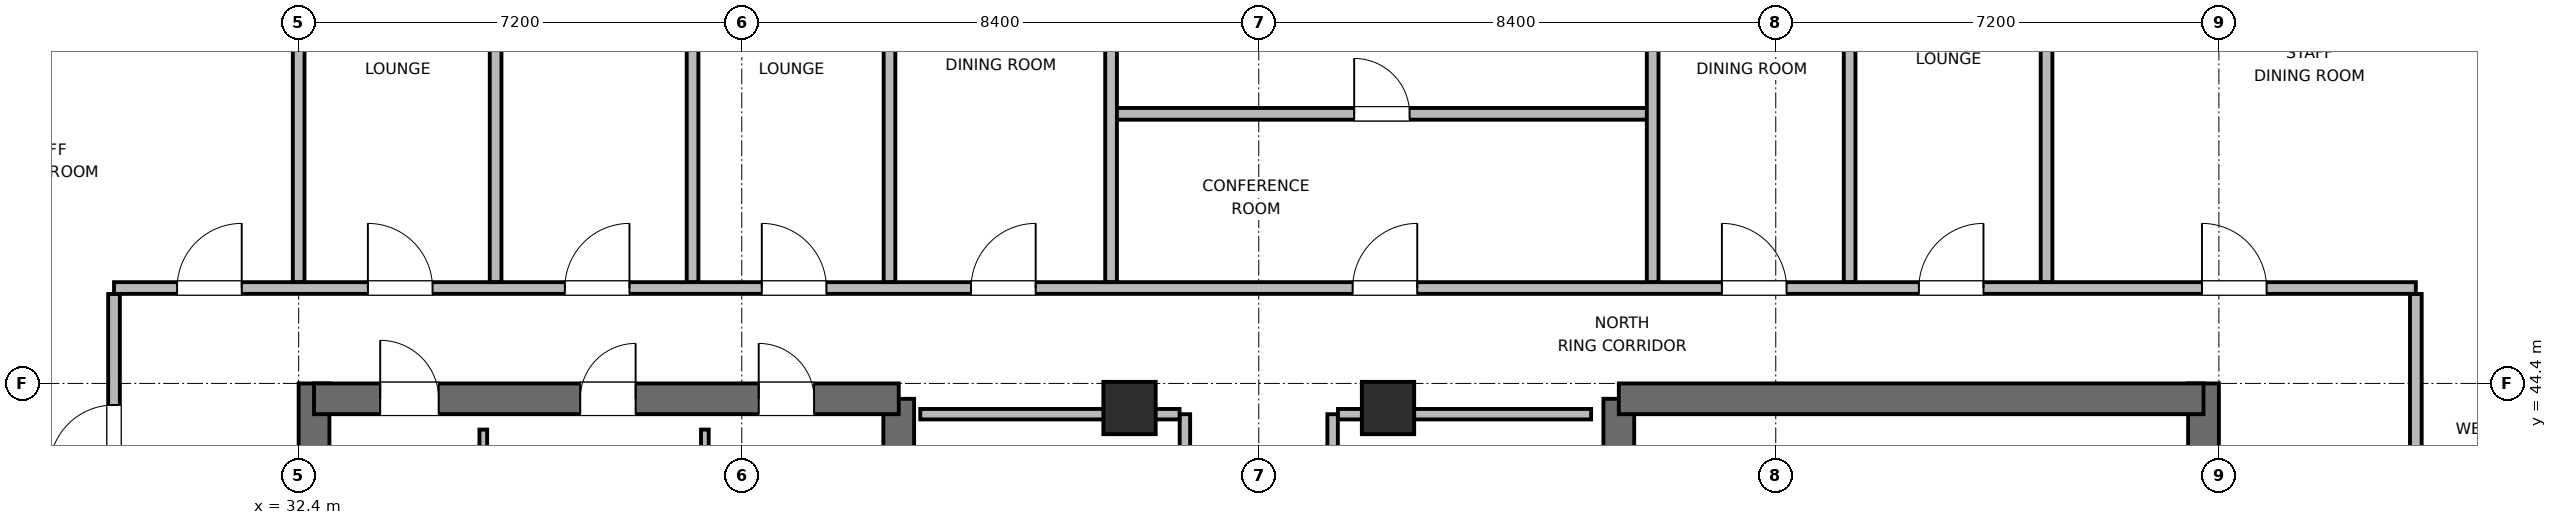
"""IFC4 building model, lengths in metres.
Left out: names, types, materials, properties, quantities, classifications, styles, units other than length and angle.
Written with IfcOpenShell. Run it as: python <this file> out.ifc"""

import sys

from ifc_helpers import new_model, si_unit, direction, frame, frame_2d, origin, origin_2d, place, context, subcontext, project, spatial, rectangle, extrude, element, fill, save


model = new_model("IFC4")
c1 = context("Model", 3, precision=1e-05, world=origin(), true_north=direction((0.0, 1.0)))
c2 = subcontext(c1, "Body", "Model", "MODEL_VIEW")
j1 = project(units=[si_unit("LENGTHUNIT", "METRE"), si_unit("PLANEANGLEUNIT", "RADIAN")], contexts=[c1])
p1 = place(None, origin())
s1 = spatial("IfcSite", under=j1, at=p1, CompositionType="ELEMENT")
p2 = place(p1, origin())
s2 = spatial("IfcBuilding", under=s1, at=p2, CompositionType="ELEMENT")
p3 = place(p2, frame((0.0, 0.0, 346.5)))
s3 = spatial("IfcBuildingStorey", under=s2, at=p3, CompositionType="ELEMENT", Elevation=346.5)
p4 = place(p3, frame((32.65, 27.6, 0.0), z_axis=(0.0, 0.0, 1.0), x_axis=(0.0, 1.0, 0.0)))
e1 = element("IfcWall", 1, at=p4, inside=s3, PredefinedType="SHEAR", context=c2, shape_type="SweptSolid", body=[
    extrude(rectangle(XDim=16.8, YDim=0.5, at=frame_2d((8.4, 0.0))), origin(), (0.0, 0.0, 1.0), 3.9),
])
p5 = place(p3, frame((42.15, 37.8, 0.0), z_axis=(0.0, 0.0, 1.0), x_axis=(0.0, 1.0, 0.0)))
e2 = element("IfcWall", 2, at=p5, inside=s3, PredefinedType="SHEAR", context=c2, shape_type="SweptSolid", body=[
    extrude(rectangle(XDim=6.35, YDim=0.5, at=frame_2d((3.175, 0.0))), origin(), (0.0, 0.0, 1.0), 3.9),
])
p6 = place(p3, frame((32.65, 44.15, 0.0), z_axis=(0.0, 0.0, 1.0), x_axis=(1.0, 0.0, 0.0)))
e3 = element("IfcWall", 3, at=p6, inside=s3, PredefinedType="SHEAR", context=c2, shape_type="SweptSolid", body=[
    extrude(rectangle(XDim=9.5, YDim=0.5, at=frame_2d((4.75, 0.0))), origin(), (0.0, 0.0, 1.0), 3.9),
])
p7 = place(p6, frame((1.075, 0.0, 0.0)))
e4 = element("IfcOpeningElement", 4, at=p7, cuts=e3, PredefinedType="OPENING", context=c2, shape_type="SweptSolid", body=[
    extrude(rectangle(XDim=0.95, YDim=2.04, at=frame_2d((0.475, 1.02))), frame((0.0, 0.26, 0.0), z_axis=(0.0, -1.0, 0.0), x_axis=(1.0, 0.0, 0.0)), (0.0, 0.0, 1.0), 0.52),
])
p8 = place(p6, frame((4.325, 0.0, 0.0)))
e5 = element("IfcOpeningElement", 5, at=p8, cuts=e3, PredefinedType="OPENING", context=c2, shape_type="SweptSolid", body=[
    extrude(rectangle(XDim=0.9, YDim=2.02, at=frame_2d((0.45, 1.01))), frame((0.0, 0.26, 0.0), z_axis=(0.0, -1.0, 0.0), x_axis=(1.0, 0.0, 0.0)), (0.0, 0.0, 1.0), 0.52),
])
p9 = place(p6, frame((7.225, 0.0, 0.0)))
e6 = element("IfcOpeningElement", 6, at=p9, cuts=e3, PredefinedType="OPENING", context=c2, shape_type="SweptSolid", body=[
    extrude(rectangle(XDim=0.9, YDim=2.02, at=frame_2d((0.45, 1.01))), frame((0.0, 0.26, 0.0), z_axis=(0.0, -1.0, 0.0), x_axis=(1.0, 0.0, 0.0)), (0.0, 0.0, 1.0), 0.52),
])
p10 = place(p3, frame((53.85, 38.0, 0.0), z_axis=(0.0, 0.0, 1.0), x_axis=(0.0, 1.0, 0.0)))
e7 = element("IfcWall", 7, at=p10, inside=s3, PredefinedType="SHEAR", context=c2, shape_type="SweptSolid", body=[
    extrude(rectangle(XDim=6.15, YDim=0.5, at=frame_2d((3.075, 0.0))), origin(), (0.0, 0.0, 1.0), 3.9),
])
p11 = place(p3, frame((63.35, 27.6, 0.0), z_axis=(0.0, 0.0, 1.0), x_axis=(0.0, 1.0, 0.0)))
e8 = element("IfcWall", 8, at=p11, inside=s3, PredefinedType="SHEAR", context=c2, shape_type="SweptSolid", body=[
    extrude(rectangle(XDim=16.8, YDim=0.5, at=frame_2d((8.4, 0.0))), origin(), (0.0, 0.0, 1.0), 3.9),
])
p12 = place(p3, frame((53.85, 44.15, 0.0), z_axis=(0.0, 0.0, 1.0), x_axis=(1.0, 0.0, 0.0)))
e9 = element("IfcWall", 9, at=p12, inside=s3, PredefinedType="SHEAR", context=c2, shape_type="SweptSolid", body=[
    extrude(rectangle(XDim=9.5, YDim=0.5, at=frame_2d((4.75, 0.0))), origin(), (0.0, 0.0, 1.0), 3.9),
])
for number, where, z_axis, x_axis in (
    (10, (45.9, 44.0, 0.0), (0.0, 0.0, 1.0), (1.0, 0.0, 0.0)),
    (11, (50.1, 44.0, 0.0), (0.0, 0.0, 1.0), (1.0, 0.0, 0.0)),
):
    element("IfcColumn", number, at=place(p3, frame(where, z_axis=z_axis, x_axis=x_axis)), inside=s3, PredefinedType="COLUMN", context=c2, shape_type="SweptSolid", body=[
        extrude(rectangle(XDim=0.85, YDim=0.85, at=origin_2d()), origin(), (0.0, 0.0, 1.0), 3.9),
    ])
for number, where, z_axis, x_axis in (
    (12, (35.4, 41.095, 0.0), (0.0, 0.0, 1.0), (0.0, 1.0, 0.0)),
    (13, (39.0, 41.095, 0.0), (0.0, 0.0, 1.0), (0.0, 1.0, 0.0)),
):
    element("IfcWall", number, at=place(p3, frame(where, z_axis=z_axis, x_axis=x_axis)), inside=s3, PredefinedType="PARTITIONING", context=c2, shape_type="SweptSolid", body=[
        extrude(rectangle(XDim=2.555, YDim=0.125, at=frame_2d((1.277, 0.0))), origin(), (0.0, 0.0, 1.0), 3.68),
    ])
p13 = place(p3, frame((46.8, 37.9, 0.0), z_axis=(0.0, 0.0, 1.0), x_axis=(0.0, 1.0, 0.0)))
e14 = element("IfcWall", 14, at=p13, inside=s3, PredefinedType="PARTITIONING", context=c2, shape_type="SweptSolid", body=[
    extrude(rectangle(XDim=6.0, YDim=0.17, at=frame_2d((3.0, 0.0))), origin(), (0.0, 0.0, 1.0), 3.68),
])
p14 = place(p13, frame((2.55, 0.0, 0.0)))
e15 = element("IfcOpeningElement", 15, at=p14, cuts=e14, PredefinedType="OPENING", context=c2, shape_type="SweptSolid", body=[
    extrude(rectangle(XDim=0.9, YDim=2.02, at=frame_2d((0.45, 1.01))), frame((0.0, 0.095, 0.0), z_axis=(0.0, -1.0, 0.0), x_axis=(1.0, 0.0, 0.0)), (0.0, 0.0, 1.0), 0.19),
])
p15 = place(p3, frame((42.5, 43.9, 0.0), z_axis=(0.0, 0.0, 1.0), x_axis=(1.0, 0.0, 0.0)))
e16 = element("IfcWall", 16, at=p15, inside=s3, PredefinedType="PARTITIONING", context=c2, shape_type="SweptSolid", body=[
    extrude(rectangle(XDim=4.213, YDim=0.17, at=frame_2d((2.106, 0.0))), origin(), (0.0, 0.0, 1.0), 2.765),
])
p16 = place(p3, frame((49.2, 37.9, 0.0), z_axis=(0.0, 0.0, 1.0), x_axis=(0.0, 1.0, 0.0)))
e17 = element("IfcWall", 17, at=p16, inside=s3, PredefinedType="PARTITIONING", context=c2, shape_type="SweptSolid", body=[
    extrude(rectangle(XDim=6.0, YDim=0.17, at=frame_2d((3.0, 0.0))), origin(), (0.0, 0.0, 1.0), 3.68),
])
p17 = place(p16, frame((1.47, 0.0, 0.0)))
e18 = element("IfcOpeningElement", 18, at=p17, cuts=e17, PredefinedType="OPENING", context=c2, shape_type="SweptSolid", body=[
    extrude(rectangle(XDim=0.9, YDim=2.02, at=frame_2d((0.45, 1.01))), frame((0.0, 0.095, 0.0), z_axis=(0.0, -1.0, 0.0), x_axis=(1.0, 0.0, 0.0)), (0.0, 0.0, 1.0), 0.19),
])
p18 = place(p16, frame((4.47, 0.0, 0.0)))
e19 = element("IfcOpeningElement", 19, at=p18, cuts=e17, PredefinedType="OPENING", context=c2, shape_type="SweptSolid", body=[
    extrude(rectangle(XDim=0.9, YDim=2.02, at=frame_2d((0.45, 1.01))), frame((0.0, 0.095, 0.0), z_axis=(0.0, -1.0, 0.0), x_axis=(1.0, 0.0, 0.0)), (0.0, 0.0, 1.0), 0.19),
])
p19 = place(p3, frame((49.287, 43.9, 0.0), z_axis=(0.0, 0.0, 1.0), x_axis=(1.0, 0.0, 0.0)))
e20 = element("IfcWall", 20, at=p19, inside=s3, PredefinedType="PARTITIONING", context=c2, shape_type="SweptSolid", body=[
    extrude(rectangle(XDim=4.113, YDim=0.17, at=frame_2d((2.056, 0.0))), origin(), (0.0, 0.0, 1.0), 2.765),
])
p20 = place(p3, frame((29.4, 45.95, 0.0), z_axis=(0.0, 0.0, 1.0), x_axis=(1.0, 0.0, 0.0)))
e21 = element("IfcWall", 21, at=p20, inside=s3, PredefinedType="PLUMBINGWALL", context=c2, shape_type="SweptSolid", body=[
    extrude(rectangle(XDim=37.4, YDim=0.19, at=frame_2d((18.7, 0.0))), origin(), (0.0, 0.0, 1.0), 3.68),
])
p21 = place(p20, frame((1.025, 0.0, 0.0)))
e22 = element("IfcOpeningElement", 22, at=p21, cuts=e21, PredefinedType="OPENING", context=c2, shape_type="SweptSolid", body=[
    extrude(rectangle(XDim=1.05, YDim=2.04, at=frame_2d((0.525, 1.02))), frame((0.0, 0.105, 0.0), z_axis=(0.0, -1.0, 0.0), x_axis=(1.0, 0.0, 0.0)), (0.0, 0.0, 1.0), 0.21),
])
p22 = place(p20, frame((4.125, 0.0, 0.0)))
e23 = element("IfcOpeningElement", 23, at=p22, cuts=e21, PredefinedType="OPENING", context=c2, shape_type="SweptSolid", body=[
    extrude(rectangle(XDim=1.05, YDim=2.04, at=frame_2d((0.525, 1.02))), frame((0.0, 0.105, 0.0), z_axis=(0.0, -1.0, 0.0), x_axis=(1.0, 0.0, 0.0)), (0.0, 0.0, 1.0), 0.21),
])
p23 = place(p20, frame((7.325, 0.0, 0.0)))
e24 = element("IfcOpeningElement", 24, at=p23, cuts=e21, PredefinedType="OPENING", context=c2, shape_type="SweptSolid", body=[
    extrude(rectangle(XDim=1.05, YDim=2.04, at=frame_2d((0.525, 1.02))), frame((0.0, 0.105, 0.0), z_axis=(0.0, -1.0, 0.0), x_axis=(1.0, 0.0, 0.0)), (0.0, 0.0, 1.0), 0.21),
])
p24 = place(p20, frame((10.525, 0.0, 0.0)))
e25 = element("IfcOpeningElement", 25, at=p24, cuts=e21, PredefinedType="OPENING", context=c2, shape_type="SweptSolid", body=[
    extrude(rectangle(XDim=1.05, YDim=2.04, at=frame_2d((0.525, 1.02))), frame((0.0, 0.105, 0.0), z_axis=(0.0, -1.0, 0.0), x_axis=(1.0, 0.0, 0.0)), (0.0, 0.0, 1.0), 0.21),
])
p25 = place(p20, frame((13.925, 0.0, 0.0)))
e26 = element("IfcOpeningElement", 26, at=p25, cuts=e21, PredefinedType="OPENING", context=c2, shape_type="SweptSolid", body=[
    extrude(rectangle(XDim=1.05, YDim=2.04, at=frame_2d((0.525, 1.02))), frame((0.0, 0.105, 0.0), z_axis=(0.0, -1.0, 0.0), x_axis=(1.0, 0.0, 0.0)), (0.0, 0.0, 1.0), 0.21),
])
p26 = place(p20, frame((20.125, 0.0, 0.0)))
e27 = element("IfcOpeningElement", 27, at=p26, cuts=e21, PredefinedType="OPENING", context=c2, shape_type="SweptSolid", body=[
    extrude(rectangle(XDim=1.05, YDim=2.04, at=frame_2d((0.525, 1.02))), frame((0.0, 0.105, 0.0), z_axis=(0.0, -1.0, 0.0), x_axis=(1.0, 0.0, 0.0)), (0.0, 0.0, 1.0), 0.21),
])
p27 = place(p20, frame((26.125, 0.0, 0.0)))
e28 = element("IfcOpeningElement", 28, at=p27, cuts=e21, PredefinedType="OPENING", context=c2, shape_type="SweptSolid", body=[
    extrude(rectangle(XDim=1.05, YDim=2.04, at=frame_2d((0.525, 1.02))), frame((0.0, 0.105, 0.0), z_axis=(0.0, -1.0, 0.0), x_axis=(1.0, 0.0, 0.0)), (0.0, 0.0, 1.0), 0.21),
])
p28 = place(p20, frame((29.325, 0.0, 0.0)))
e29 = element("IfcOpeningElement", 29, at=p28, cuts=e21, PredefinedType="OPENING", context=c2, shape_type="SweptSolid", body=[
    extrude(rectangle(XDim=1.05, YDim=2.04, at=frame_2d((0.525, 1.02))), frame((0.0, 0.105, 0.0), z_axis=(0.0, -1.0, 0.0), x_axis=(1.0, 0.0, 0.0)), (0.0, 0.0, 1.0), 0.21),
])
p29 = place(p20, frame((33.925, 0.0, 0.0)))
e30 = element("IfcOpeningElement", 30, at=p29, cuts=e21, PredefinedType="OPENING", context=c2, shape_type="SweptSolid", body=[
    extrude(rectangle(XDim=1.05, YDim=2.04, at=frame_2d((0.525, 1.02))), frame((0.0, 0.105, 0.0), z_axis=(0.0, -1.0, 0.0), x_axis=(1.0, 0.0, 0.0)), (0.0, 0.0, 1.0), 0.21),
])
p30 = place(p3, frame((29.4, 26.147, 0.0), z_axis=(0.0, 0.0, 1.0), x_axis=(0.0, 1.0, 0.0)))
e31 = element("IfcWall", 31, at=p30, inside=s3, PredefinedType="PLUMBINGWALL", context=c2, shape_type="SweptSolid", body=[
    extrude(rectangle(XDim=19.706, YDim=0.19, at=frame_2d((9.853, 0.0))), origin(), (0.0, 0.0, 1.0), 3.68),
])
p31 = place(p30, frame((1.903, 0.0, 0.0)))
e32 = element("IfcOpeningElement", 32, at=p31, cuts=e31, PredefinedType="OPENING", context=c2, shape_type="SweptSolid", body=[
    extrude(rectangle(XDim=1.05, YDim=2.04, at=frame_2d((0.525, 1.02))), frame((0.0, 0.105, 0.0), z_axis=(0.0, -1.0, 0.0), x_axis=(1.0, 0.0, 0.0)), (0.0, 0.0, 1.0), 0.21),
])
p32 = place(p30, frame((6.878, 0.0, 0.0)))
e33 = element("IfcOpeningElement", 33, at=p32, cuts=e31, PredefinedType="OPENING", context=c2, shape_type="SweptSolid", body=[
    extrude(rectangle(XDim=1.05, YDim=2.04, at=frame_2d((0.525, 1.02))), frame((0.0, 0.105, 0.0), z_axis=(0.0, -1.0, 0.0), x_axis=(1.0, 0.0, 0.0)), (0.0, 0.0, 1.0), 0.21),
])
p33 = place(p30, frame((11.878, 0.0, 0.0)))
e34 = element("IfcOpeningElement", 34, at=p33, cuts=e31, PredefinedType="OPENING", context=c2, shape_type="SweptSolid", body=[
    extrude(rectangle(XDim=1.05, YDim=2.04, at=frame_2d((0.525, 1.02))), frame((0.0, 0.105, 0.0), z_axis=(0.0, -1.0, 0.0), x_axis=(1.0, 0.0, 0.0)), (0.0, 0.0, 1.0), 0.21),
])
p34 = place(p30, frame((16.853, 0.0, 0.0)))
e35 = element("IfcOpeningElement", 35, at=p34, cuts=e31, PredefinedType="OPENING", context=c2, shape_type="SweptSolid", body=[
    extrude(rectangle(XDim=1.05, YDim=2.04, at=frame_2d((0.525, 1.02))), frame((0.0, 0.105, 0.0), z_axis=(0.0, -1.0, 0.0), x_axis=(1.0, 0.0, 0.0)), (0.0, 0.0, 1.0), 0.21),
])
p35 = place(p3, frame((66.8, 26.147, 0.0), z_axis=(0.0, 0.0, 1.0), x_axis=(0.0, 1.0, 0.0)))
e36 = element("IfcWall", 36, at=p35, inside=s3, PredefinedType="PLUMBINGWALL", context=c2, shape_type="SweptSolid", body=[
    extrude(rectangle(XDim=19.706, YDim=0.19, at=frame_2d((9.853, 0.0))), origin(), (0.0, 0.0, 1.0), 3.68),
])
p36 = place(p35, frame((3.903, 0.0, 0.0)))
e37 = element("IfcOpeningElement", 37, at=p36, cuts=e36, PredefinedType="OPENING", context=c2, shape_type="SweptSolid", body=[
    extrude(rectangle(XDim=1.05, YDim=2.04, at=frame_2d((0.525, 1.02))), frame((0.0, 0.105, 0.0), z_axis=(0.0, -1.0, 0.0), x_axis=(1.0, 0.0, 0.0)), (0.0, 0.0, 1.0), 0.21),
])
p37 = place(p35, frame((13.853, 0.0, 0.0)))
e38 = element("IfcOpeningElement", 38, at=p37, cuts=e36, PredefinedType="OPENING", context=c2, shape_type="SweptSolid", body=[
    extrude(rectangle(XDim=1.05, YDim=2.04, at=frame_2d((0.525, 1.02))), frame((0.0, 0.105, 0.0), z_axis=(0.0, -1.0, 0.0), x_axis=(1.0, 0.0, 0.0)), (0.0, 0.0, 1.0), 0.21),
])
p38 = place(p3, frame((32.4, 46.047, 0.0), z_axis=(0.0, 0.0, 1.0), x_axis=(0.0, 1.0, 0.0)))
e39 = element("IfcWall", 39, at=p38, inside=s3, PredefinedType="PLUMBINGWALL", context=c2, shape_type="SweptSolid", body=[
    extrude(rectangle(XDim=7.108, YDim=0.19, at=frame_2d((3.554, 0.0))), origin(), (0.0, 0.0, 1.0), 3.054),
])
for number, where, z_axis, x_axis in (
    (40, (35.6, 46.047, 0.0), (0.0, 0.0, 1.0), (0.0, 1.0, 0.0)),
    (41, (38.8, 46.047, 0.0), (0.0, 0.0, 1.0), (0.0, 1.0, 0.0)),
):
    element("IfcWall", number, at=place(p3, frame(where, z_axis=z_axis, x_axis=x_axis)), inside=s3, PredefinedType="PLUMBINGWALL", context=c2, shape_type="SweptSolid", body=[
        extrude(rectangle(XDim=7.108, YDim=0.19, at=frame_2d((3.554, 0.0))), origin(), (0.0, 0.0, 1.0), 3.68),
    ])
p39 = place(p3, frame((42.0, 46.047, 0.0), z_axis=(0.0, 0.0, 1.0), x_axis=(0.0, 1.0, 0.0)))
e42 = element("IfcWall", 42, at=p39, inside=s3, PredefinedType="PLUMBINGWALL", context=c2, shape_type="SweptSolid", body=[
    extrude(rectangle(XDim=6.77, YDim=0.19, at=frame_2d((3.385, 0.0))), origin(), (0.0, 0.0, 1.0), 3.043),
])
p40 = place(p3, frame((45.6, 48.78, 0.0), z_axis=(0.0, 0.0, 1.0), x_axis=(1.0, 0.0, 0.0)))
e43 = element("IfcWall", 43, at=p40, inside=s3, PredefinedType="PLUMBINGWALL", context=c2, shape_type="SweptSolid", body=[
    extrude(rectangle(XDim=8.8, YDim=0.19, at=frame_2d((4.4, 0.0))), origin(), (0.0, 0.0, 1.0), 3.311),
])
p41 = place(p40, frame((3.95, 0.0, 0.0)))
e44 = element("IfcOpeningElement", 44, at=p41, cuts=e43, PredefinedType="OPENING", context=c2, shape_type="SweptSolid", body=[
    extrude(rectangle(XDim=0.9, YDim=2.02, at=frame_2d((0.45, 1.01))), frame((0.0, 0.105, 0.0), z_axis=(0.0, -1.0, 0.0), x_axis=(1.0, 0.0, 0.0)), (0.0, 0.0, 1.0), 0.21),
])
p42 = place(p3, frame((45.6, 46.047, 0.0), z_axis=(0.0, 0.0, 1.0), x_axis=(0.0, 1.0, 0.0)))
e45 = element("IfcWall", 45, at=p42, inside=s3, PredefinedType="PLUMBINGWALL", context=c2, shape_type="SweptSolid", body=[
    extrude(rectangle(XDim=5.878, YDim=0.19, at=frame_2d((2.939, 0.0))), origin(), (0.0, 0.0, 1.0), 3.68),
])
p43 = place(p3, frame((54.4, 46.047, 0.0), z_axis=(0.0, 0.0, 1.0), x_axis=(0.0, 1.0, 0.0)))
e46 = element("IfcWall", 46, at=p43, inside=s3, PredefinedType="PLUMBINGWALL", context=c2, shape_type="SweptSolid", body=[
    extrude(rectangle(XDim=6.955, YDim=0.19, at=frame_2d((3.478, 0.0))), origin(), (0.0, 0.0, 1.0), 3.043),
])
for number, where, z_axis, x_axis in (
    (47, (57.6, 46.047, 0.0), (0.0, 0.0, 1.0), (0.0, 1.0, 0.0)),
    (48, (60.8, 46.047, 0.0), (0.0, 0.0, 1.0), (0.0, 1.0, 0.0)),
):
    element("IfcWall", number, at=place(p3, frame(where, z_axis=z_axis, x_axis=x_axis)), inside=s3, PredefinedType="PLUMBINGWALL", context=c2, shape_type="SweptSolid", body=[
        extrude(rectangle(XDim=7.078, YDim=0.19, at=frame_2d((3.539, 0.0))), origin(), (0.0, 0.0, 1.0), 3.68),
    ])
p44 = place(p7, origin())
e49 = element("IfcDoor", 49, at=p44, inside=s3, OperationType="SINGLE_SWING_LEFT", PredefinedType="DOOR", context=c2, shape_type="SweptSolid", body=[
    extrude(rectangle(XDim=0.95, YDim=2.04, at=frame_2d((0.475, 1.02))), frame((0.0, 0.025, 0.0), z_axis=(0.0, -1.0, 0.0), x_axis=(1.0, 0.0, 0.0)), (0.0, 0.0, 1.0), 0.05),
])
fill(e4, e49)
p45 = place(p8, origin())
e50 = element("IfcDoor", 50, at=p45, inside=s3, OperationType="SINGLE_SWING_RIGHT", PredefinedType="DOOR", context=c2, shape_type="SweptSolid", body=[
    extrude(rectangle(XDim=0.9, YDim=2.02, at=frame_2d((0.45, 1.01))), frame((0.0, 0.025, 0.0), z_axis=(0.0, -1.0, 0.0), x_axis=(1.0, 0.0, 0.0)), (0.0, 0.0, 1.0), 0.05),
])
fill(e5, e50)
p46 = place(p9, origin())
e51 = element("IfcDoor", 51, at=p46, inside=s3, OperationType="SINGLE_SWING_LEFT", PredefinedType="DOOR", context=c2, shape_type="SweptSolid", body=[
    extrude(rectangle(XDim=0.9, YDim=2.02, at=frame_2d((0.45, 1.01))), frame((0.0, 0.025, 0.0), z_axis=(0.0, -1.0, 0.0), x_axis=(1.0, 0.0, 0.0)), (0.0, 0.0, 1.0), 0.05),
])
fill(e6, e51)
p47 = place(p21, origin())
e52 = element("IfcDoor", 52, at=p47, inside=s3, OperationType="SINGLE_SWING_RIGHT", PredefinedType="DOOR", context=c2, shape_type="SweptSolid", body=[
    extrude(rectangle(XDim=1.05, YDim=2.04, at=frame_2d((0.525, 1.02))), frame((0.0, 0.025, 0.0), z_axis=(0.0, -1.0, 0.0), x_axis=(1.0, 0.0, 0.0)), (0.0, 0.0, 1.0), 0.05),
])
fill(e22, e52)
p48 = place(p22, origin())
e53 = element("IfcDoor", 53, at=p48, inside=s3, OperationType="SINGLE_SWING_LEFT", PredefinedType="DOOR", context=c2, shape_type="SweptSolid", body=[
    extrude(rectangle(XDim=1.05, YDim=2.04, at=frame_2d((0.525, 1.02))), frame((0.0, 0.025, 0.0), z_axis=(0.0, -1.0, 0.0), x_axis=(1.0, 0.0, 0.0)), (0.0, 0.0, 1.0), 0.05),
])
fill(e23, e53)
p49 = place(p23, origin())
e54 = element("IfcDoor", 54, at=p49, inside=s3, OperationType="SINGLE_SWING_RIGHT", PredefinedType="DOOR", context=c2, shape_type="SweptSolid", body=[
    extrude(rectangle(XDim=1.05, YDim=2.04, at=frame_2d((0.525, 1.02))), frame((0.0, 0.025, 0.0), z_axis=(0.0, -1.0, 0.0), x_axis=(1.0, 0.0, 0.0)), (0.0, 0.0, 1.0), 0.05),
])
fill(e24, e54)
p50 = place(p24, origin())
e55 = element("IfcDoor", 55, at=p50, inside=s3, OperationType="SINGLE_SWING_LEFT", PredefinedType="DOOR", context=c2, shape_type="SweptSolid", body=[
    extrude(rectangle(XDim=1.05, YDim=2.04, at=frame_2d((0.525, 1.02))), frame((0.0, 0.025, 0.0), z_axis=(0.0, -1.0, 0.0), x_axis=(1.0, 0.0, 0.0)), (0.0, 0.0, 1.0), 0.05),
])
fill(e25, e55)
p51 = place(p25, origin())
e56 = element("IfcDoor", 56, at=p51, inside=s3, OperationType="SINGLE_SWING_RIGHT", PredefinedType="DOOR", context=c2, shape_type="SweptSolid", body=[
    extrude(rectangle(XDim=1.05, YDim=2.04, at=frame_2d((0.525, 1.02))), frame((0.0, 0.025, 0.0), z_axis=(0.0, -1.0, 0.0), x_axis=(1.0, 0.0, 0.0)), (0.0, 0.0, 1.0), 0.05),
])
fill(e26, e56)
p52 = place(p41, origin())
e57 = element("IfcDoor", 57, at=p52, inside=s3, OperationType="SINGLE_SWING_LEFT", PredefinedType="DOOR", context=c2, shape_type="SweptSolid", body=[
    extrude(rectangle(XDim=0.9, YDim=2.02, at=frame_2d((0.45, 1.01))), frame((0.0, 0.025, 0.0), z_axis=(0.0, -1.0, 0.0), x_axis=(1.0, 0.0, 0.0)), (0.0, 0.0, 1.0), 0.05),
])
fill(e44, e57)
p53 = place(p26, origin())
e58 = element("IfcDoor", 58, at=p53, inside=s3, OperationType="SINGLE_SWING_RIGHT", PredefinedType="DOOR", context=c2, shape_type="SweptSolid", body=[
    extrude(rectangle(XDim=1.05, YDim=2.04, at=frame_2d((0.525, 1.02))), frame((0.0, 0.025, 0.0), z_axis=(0.0, -1.0, 0.0), x_axis=(1.0, 0.0, 0.0)), (0.0, 0.0, 1.0), 0.05),
])
fill(e27, e58)
p54 = place(p27, origin())
e59 = element("IfcDoor", 59, at=p54, inside=s3, OperationType="SINGLE_SWING_LEFT", PredefinedType="DOOR", context=c2, shape_type="SweptSolid", body=[
    extrude(rectangle(XDim=1.05, YDim=2.04, at=frame_2d((0.525, 1.02))), frame((0.0, 0.025, 0.0), z_axis=(0.0, -1.0, 0.0), x_axis=(1.0, 0.0, 0.0)), (0.0, 0.0, 1.0), 0.05),
])
fill(e28, e59)
p55 = place(p28, origin())
e60 = element("IfcDoor", 60, at=p55, inside=s3, OperationType="SINGLE_SWING_RIGHT", PredefinedType="DOOR", context=c2, shape_type="SweptSolid", body=[
    extrude(rectangle(XDim=1.05, YDim=2.04, at=frame_2d((0.525, 1.02))), frame((0.0, 0.025, 0.0), z_axis=(0.0, -1.0, 0.0), x_axis=(1.0, 0.0, 0.0)), (0.0, 0.0, 1.0), 0.05),
])
fill(e29, e60)
p56 = place(p29, origin())
e61 = element("IfcDoor", 61, at=p56, inside=s3, OperationType="SINGLE_SWING_LEFT", PredefinedType="DOOR", context=c2, shape_type="SweptSolid", body=[
    extrude(rectangle(XDim=1.05, YDim=2.04, at=frame_2d((0.525, 1.02))), frame((0.0, 0.025, 0.0), z_axis=(0.0, -1.0, 0.0), x_axis=(1.0, 0.0, 0.0)), (0.0, 0.0, 1.0), 0.05),
])
fill(e30, e61)
p57 = place(p34, origin())
e62 = element("IfcDoor", 62, at=p57, inside=s3, OperationType="SINGLE_SWING_LEFT", PredefinedType="DOOR", context=c2, shape_type="SweptSolid", body=[
    extrude(rectangle(XDim=1.05, YDim=2.04, at=frame_2d((0.525, 1.02))), frame((0.0, 0.025, 0.0), z_axis=(0.0, -1.0, 0.0), x_axis=(1.0, 0.0, 0.0)), (0.0, 0.0, 1.0), 0.05),
])
fill(e35, e62)
save(model, sys.argv[1])
